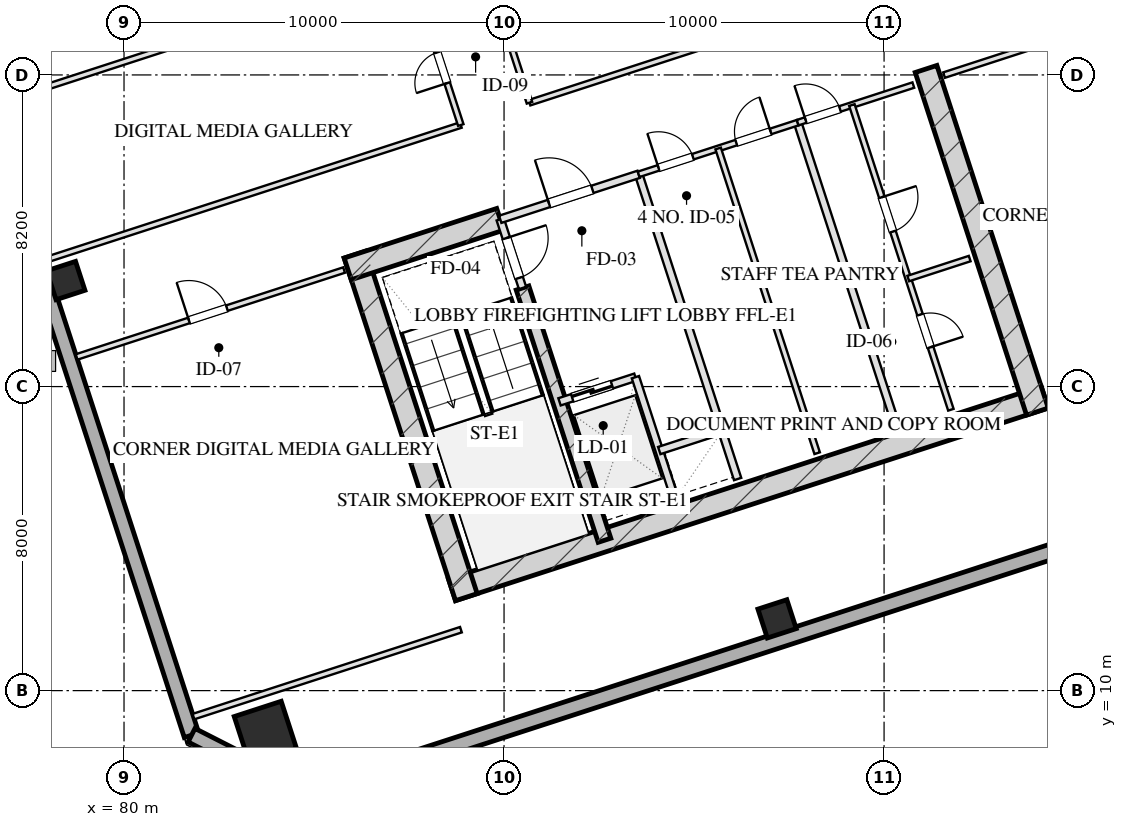
"""IFC4 building model, lengths in metres.
Left out: names, types, materials, properties, quantities, classifications, styles, units other than length and angle.
Written with IfcOpenShell. Run it as: python <this file> out.ifc"""

import sys

from ifc_helpers import new_model, si_unit, direction, frame, frame_2d, origin, origin_2d, place, context, subcontext, project, spatial, rectangle, hollow_rectangle, extrude, element, fill, save


model = new_model("IFC4")
c1 = context("Model", 3, precision=1e-05, world=origin(), true_north=direction((0.0, 1.0)))
c2 = subcontext(c1, "Body", "Model", "MODEL_VIEW")
j1 = project(units=[si_unit("LENGTHUNIT", "METRE"), si_unit("PLANEANGLEUNIT", "RADIAN")], contexts=[c1])
p1 = place(None, origin())
s1 = spatial("IfcSite", under=j1, at=p1, CompositionType="ELEMENT")
p2 = place(p1, origin())
s2 = spatial("IfcBuilding", under=s1, at=p2, CompositionType="ELEMENT")
p3 = place(p2, frame((0.0, 0.0, 173.65)))
s3 = spatial("IfcBuildingStorey", under=s2, at=p3, CompositionType="ELEMENT", Elevation=173.65)
p4 = place(p3, frame((88.63, 12.652, 0.0), z_axis=(0.0, 0.0, 1.0), x_axis=(0.95105714907, 0.309015046886, 0.0)))
e1 = element("IfcWall", 1, at=p4, inside=s3, PredefinedType="SHEAR", context=c2, shape_type="SweptSolid", body=[
    extrude(rectangle(XDim=16.4, YDim=0.6, at=frame_2d((8.2, 0.0))), origin(), (0.0, 0.0, 1.0), 3.45),
])
p5 = place(p3, frame((86.078, 21.475, 0.0), z_axis=(0.0, 0.0, 1.0), x_axis=(0.309017938678, -0.951056209472, 0.0)))
e2 = element("IfcWall", 2, at=p5, inside=s3, PredefinedType="SHEAR", context=c2, shape_type="SweptSolid", body=[
    extrude(rectangle(XDim=9.48, YDim=0.6, at=frame_2d((4.74, 0.0))), origin(), (0.0, 0.0, 1.0), 3.45),
])
p6 = place(p3, frame((101.105, 26.358, 0.0), z_axis=(0.0, 0.0, 1.0), x_axis=(0.309010370028, -0.95105866865, 0.0)))
e3 = element("IfcWall", 3, at=p6, inside=s3, PredefinedType="SHEAR", context=c2, shape_type="SweptSolid", body=[
    extrude(rectangle(XDim=9.48, YDim=0.6, at=frame_2d((4.74, 0.0))), origin(), (0.0, 0.0, 1.0), 3.45),
])
p7 = place(p3, frame((90.486, 20.594, 0.0), z_axis=(0.0, 0.0, 1.0), x_axis=(0.309020428229, -0.951055400562, 0.0)))
e4 = element("IfcWall", 4, at=p7, inside=s3, PredefinedType="SHEAR", context=c2, shape_type="SweptSolid", body=[
    extrude(rectangle(XDim=6.98, YDim=0.35, at=frame_2d((3.49, 0.0))), origin(), (0.0, 0.0, 1.0), 3.45),
])
p8 = place(p3, frame((85.886, 21.097, 0.0), z_axis=(0.0, 0.0, 1.0), x_axis=(0.951068073652, 0.308981422225, 0.0)))
e5 = element("IfcWall", 5, at=p8, inside=s3, PredefinedType="SHEAR", context=c2, shape_type="SweptSolid", body=[
    extrude(rectangle(XDim=4.22, YDim=0.6, at=frame_2d((2.11, 0.0))), origin(), (0.0, 0.0, 1.0), 3.45),
])
p9 = place(p3, frame((83.719, 8.901, 0.0), z_axis=(0.0, 0.0, 1.0), x_axis=(0.951056516295, 0.309016994375, 0.0)))
e6 = element("IfcColumn", 6, at=p9, inside=s3, PredefinedType="COLUMN", context=c2, shape_type="SweptSolid", body=[
    extrude(hollow_rectangle(XDim=1.3, YDim=1.3, WallThickness=0.045, at=origin_2d()), origin(), (0.0, 0.0, 1.0), 3.451),
])
for number, where, z_axis, x_axis in (
    (7, (78.468, 20.79, 0.0), (0.0, 0.0, 1.0), (0.951, 0.309, 0.0)),
    (8, (97.185, 11.888, 0.0), (0.0, 0.0, 1.0), (0.951, 0.309, 0.0)),
):
    element("IfcColumn", number, at=place(p3, frame(where, z_axis=z_axis, x_axis=x_axis)), inside=s3, PredefinedType="COLUMN", context=c2, shape_type="SweptSolid", body=[
        extrude(hollow_rectangle(XDim=0.8, YDim=0.8, WallThickness=0.028, at=origin_2d()), origin(), (0.0, 0.0, 1.0), 3.451),
    ])
p10 = place(p3, frame((81.776, 8.827, 0.0), z_axis=(0.0, 0.0, 1.0), x_axis=(-0.309014228706, 0.951057414911, 0.0)))
e9 = element("IfcWall", 9, at=p10, inside=s3, PredefinedType="SOLIDWALL", context=c2, shape_type="SweptSolid", body=[
    extrude(rectangle(XDim=42.8, YDim=0.4, at=frame_2d((21.4, 0.0))), origin(), (0.0, 0.0, 1.0), 2.61),
])
p11 = place(p10, frame((18.25, 0.0, 0.0)))
e10 = element("IfcOpeningElement", 10, at=p11, cuts=e9, PredefinedType="OPENING", context=c2, shape_type="SweptSolid", body=[
    extrude(rectangle(XDim=1.1, YDim=2.15, at=frame_2d((0.55, 1.075))), frame((0.0, 0.21, 0.0), z_axis=(0.0, -1.0, 0.0), x_axis=(1.0, 0.0, 0.0)), (0.0, 0.0, 1.0), 0.42),
])
p12 = place(p3, frame((98.224, 59.173, 0.0), z_axis=(0.0, 0.0, 1.0), x_axis=(0.309014228706, -0.951057414911, 0.0)))
e11 = element("IfcWall", 11, at=p12, inside=s3, PredefinedType="SOLIDWALL", context=c2, shape_type="SweptSolid", body=[
    extrude(rectangle(XDim=42.8, YDim=0.4, at=frame_2d((21.4, 0.0))), origin(), (0.0, 0.0, 1.0), 2.61),
])
p13 = place(p12, frame((17.675, 0.0, 0.75)))
e12 = element("IfcOpeningElement", 12, at=p13, cuts=e11, PredefinedType="OPENING", context=c2, shape_type="SweptSolid", body=[
    extrude(rectangle(XDim=2.25, YDim=1.46, at=frame_2d((1.125, 0.73))), frame((0.0, 0.21, 0.0), z_axis=(0.0, -1.0, 0.0), x_axis=(1.0, 0.0, 0.0)), (0.0, 0.0, 1.0), 0.42),
])
p14 = place(p12, frame((13.875, 0.0, 0.75)))
e13 = element("IfcOpeningElement", 13, at=p14, cuts=e11, PredefinedType="OPENING", context=c2, shape_type="SweptSolid", body=[
    extrude(rectangle(XDim=2.25, YDim=1.46, at=frame_2d((1.125, 0.73))), frame((0.0, 0.21, 0.0), z_axis=(0.0, -1.0, 0.0), x_axis=(1.0, 0.0, 0.0)), (0.0, 0.0, 1.0), 0.42),
])
p15 = place(p12, frame((25.25, 0.0, 0.0)))
e14 = element("IfcOpeningElement", 14, at=p15, cuts=e11, PredefinedType="OPENING", context=c2, shape_type="SweptSolid", body=[
    extrude(rectangle(XDim=1.1, YDim=2.15, at=frame_2d((0.55, 1.075))), frame((0.0, 0.21, 0.0), z_axis=(0.0, -1.0, 0.0), x_axis=(1.0, 0.0, 0.0)), (0.0, 0.0, 1.0), 0.42),
])
p16 = place(p3, frame((109.908, 15.444, 0.0), z_axis=(0.0, 0.0, 1.0), x_axis=(-0.951057580055, -0.30901372044, 0.0)))
e15 = element("IfcWall", 15, at=p16, inside=s3, PredefinedType="SOLIDWALL", context=c2, shape_type="SweptSolid", body=[
    extrude(rectangle(XDim=26.4, YDim=0.4, at=frame_2d((13.2, 0.0))), origin(), (0.0, 0.0, 1.0), 2.61),
])
p17 = place(p3, frame((84.801, 7.286, 0.0), z_axis=(0.0, 0.0, 1.0), x_axis=(-0.891020832027, 0.453962417932, 0.0)))
e16 = element("IfcWall", 16, at=p17, inside=s3, PredefinedType="SOLIDWALL", context=c2, shape_type="SweptSolid", body=[
    extrude(rectangle(XDim=3.394, YDim=0.4, at=frame_2d((1.697, 0.0))), origin(), (0.0, 0.0, 1.0), 2.61),
])
p18 = place(p3, frame((89.899, 22.401, 0.0), z_axis=(0.0, 0.0, 1.0), x_axis=(0.308932062672, -0.951084108086, 0.0)))
e17 = element("IfcWall", 17, at=p18, inside=s3, PredefinedType="PARTITIONING", context=c2, shape_type="SweptSolid", body=[
    extrude(rectangle(XDim=1.9, YDim=0.2, at=frame_2d((0.95, 0.0))), origin(), (0.0, 0.0, 1.0), 3.175),
])
p19 = place(p18, frame((0.52, 0.0, 0.0)))
e18 = element("IfcOpeningElement", 18, at=p19, cuts=e17, PredefinedType="OPENING", context=c2, shape_type="SweptSolid", body=[
    extrude(rectangle(XDim=1.1, YDim=2.05, at=frame_2d((0.55, 1.025))), frame((0.0, 0.11, 0.0), z_axis=(0.0, -1.0, 0.0), x_axis=(1.0, 0.0, 0.0)), (0.0, 0.0, 1.0), 0.22),
])
p20 = place(p3, frame((93.542, 23.585, 0.0), z_axis=(0.0, 0.0, 1.0), x_axis=(0.309042196757, -0.951048327176, 0.0)))
e19 = element("IfcWall", 19, at=p20, inside=s3, PredefinedType="PARTITIONING", context=c2, shape_type="SweptSolid", body=[
    extrude(rectangle(XDim=8.43, YDim=0.2, at=frame_2d((4.215, 0.0))), origin(), (0.0, 0.0, 1.0), 3.175),
])
p21 = place(p3, frame((89.899, 22.401, 0.0), z_axis=(0.0, 0.0, 1.0), x_axis=(0.951046716504, 0.309047153403, 0.0)))
e20 = element("IfcWall", 20, at=p21, inside=s3, PredefinedType="PARTITIONING", context=c2, shape_type="SweptSolid", body=[
    extrude(rectangle(XDim=3.83, YDim=0.2, at=frame_2d((1.915, 0.0))), origin(), (0.0, 0.0, 1.0), 3.175),
])
p22 = place(p21, frame((1.35, 0.0, 0.0)))
e21 = element("IfcOpeningElement", 21, at=p22, cuts=e20, PredefinedType="OPENING", context=c2, shape_type="SweptSolid", body=[
    extrude(rectangle(XDim=1.2, YDim=2.05, at=frame_2d((0.6, 1.025))), frame((0.0, 0.11, 0.0), z_axis=(0.0, -1.0, 0.0), x_axis=(1.0, 0.0, 0.0)), (0.0, 0.0, 1.0), 0.22),
])
p23 = place(p3, frame((91.46, 17.598, 0.0), z_axis=(0.0, 0.0, 1.0), x_axis=(0.951062257173, 0.308999325213, 0.0)))
e22 = element("IfcWall", 22, at=p23, inside=s3, PredefinedType="PARTITIONING", context=c2, shape_type="SweptSolid", body=[
    extrude(rectangle(XDim=2.1, YDim=0.2, at=frame_2d((1.05, 0.0))), origin(), (0.0, 0.0, 1.0), 3.175),
])
p24 = place(p23, frame((0.35, 0.0, 0.0)))
e23 = element("IfcOpeningElement", 23, at=p24, cuts=e22, PredefinedType="OPENING", context=c2, shape_type="SweptSolid", body=[
    extrude(rectangle(XDim=1.1, YDim=2.05, at=frame_2d((0.55, 1.025))), frame((0.0, 0.11, 0.0), z_axis=(0.0, -1.0, 0.0), x_axis=(1.0, 0.0, 0.0)), (0.0, 0.0, 1.0), 0.22),
])
p25 = place(p3, frame((93.457, 18.247, 0.0), z_axis=(0.0, 0.0, 1.0), x_axis=(0.3089935693, -0.951064127245, 0.0)))
e24 = element("IfcWall", 24, at=p25, inside=s3, PredefinedType="PARTITIONING", context=c2, shape_type="SweptSolid", body=[
    extrude(rectangle(XDim=3.7, YDim=0.2, at=frame_2d((1.85, 0.0))), origin(), (0.0, 0.0, 1.0), 3.175),
])
p26 = place(p3, frame((94.084, 16.317, 0.0), z_axis=(0.0, 0.0, 1.0), x_axis=(0.951041328149, 0.309063734775, 0.0)))
e25 = element("IfcWall", 25, at=p26, inside=s3, PredefinedType="PARTITIONING", context=c2, shape_type="SweptSolid", body=[
    extrude(rectangle(XDim=1.73, YDim=0.2, at=frame_2d((0.865, 0.0))), origin(), (0.0, 0.0, 1.0), 3.175),
])
p27 = place(p3, frame((97.727, 24.944, 0.0), z_axis=(0.0, 0.0, 1.0), x_axis=(0.309016001439, -0.951056838919, 0.0)))
e26 = element("IfcWall", 26, at=p27, inside=s3, PredefinedType="PARTITIONING", context=c2, shape_type="SweptSolid", body=[
    extrude(rectangle(XDim=8.43, YDim=0.2, at=frame_2d((4.215, 0.0))), origin(), (0.0, 0.0, 1.0), 3.175),
])
p28 = place(p3, frame((93.542, 23.585, 0.0), z_axis=(0.0, 0.0, 1.0), x_axis=(0.951063829732, 0.308994485023, 0.0)))
e27 = element("IfcWall", 27, at=p28, inside=s3, PredefinedType="PARTITIONING", context=c2, shape_type="SweptSolid", body=[
    extrude(rectangle(XDim=4.4, YDim=0.15, at=frame_2d((2.2, 0.0))), origin(), (0.0, 0.0, 1.0), 3.175),
])
p29 = place(p28, frame((0.55, 0.0, 0.0)))
e28 = element("IfcOpeningElement", 28, at=p29, cuts=e27, PredefinedType="OPENING", context=c2, shape_type="SweptSolid", body=[
    extrude(rectangle(XDim=0.95, YDim=2.05, at=frame_2d((0.475, 1.025))), frame((0.0, 0.085, 0.0), z_axis=(0.0, -1.0, 0.0), x_axis=(1.0, 0.0, 0.0)), (0.0, 0.0, 1.0), 0.17),
])
p30 = place(p28, frame((2.7, 0.0, 0.0)))
e29 = element("IfcOpeningElement", 29, at=p30, cuts=e27, PredefinedType="OPENING", context=c2, shape_type="SweptSolid", body=[
    extrude(rectangle(XDim=0.95, YDim=2.05, at=frame_2d((0.475, 1.025))), frame((0.0, 0.085, 0.0), z_axis=(0.0, -1.0, 0.0), x_axis=(1.0, 0.0, 0.0)), (0.0, 0.0, 1.0), 0.17),
])
p31 = place(p3, frame((95.634, 24.265, 0.0), z_axis=(0.0, 0.0, 1.0), x_axis=(0.309007490203, -0.951059604335, 0.0)))
e30 = element("IfcWall", 30, at=p31, inside=s3, PredefinedType="PARTITIONING", context=c2, shape_type="SweptSolid", body=[
    extrude(rectangle(XDim=8.43, YDim=0.15, at=frame_2d((4.215, 0.0))), origin(), (0.0, 0.0, 1.0), 3.175),
])
p32 = place(p3, frame((97.727, 24.944, 0.0), z_axis=(0.0, 0.0, 1.0), x_axis=(0.951036872128, 0.309077446369, 0.0)))
e31 = element("IfcWall", 31, at=p32, inside=s3, PredefinedType="PARTITIONING", context=c2, shape_type="SweptSolid", body=[
    extrude(rectangle(XDim=3.2, YDim=0.15, at=frame_2d((1.6, 0.0))), origin(), (0.0, 0.0, 1.0), 3.175),
])
p33 = place(p32, frame((0.22, 0.0, 0.0)))
e32 = element("IfcOpeningElement", 32, at=p33, cuts=e31, PredefinedType="OPENING", context=c2, shape_type="SweptSolid", body=[
    extrude(rectangle(XDim=0.95, YDim=2.05, at=frame_2d((0.475, 1.025))), frame((0.0, 0.085, 0.0), z_axis=(0.0, -1.0, 0.0), x_axis=(1.0, 0.0, 0.0)), (0.0, 0.0, 1.0), 0.17),
])
p34 = place(p3, frame((99.153, 25.408, 0.0), z_axis=(0.0, 0.0, 1.0), x_axis=(0.309016001439, -0.951056838919, 0.0)))
e33 = element("IfcWall", 33, at=p34, inside=s3, PredefinedType="PARTITIONING", context=c2, shape_type="SweptSolid", body=[
    extrude(rectangle(XDim=8.43, YDim=0.15, at=frame_2d((4.215, 0.0))), origin(), (0.0, 0.0, 1.0), 3.175),
])
p35 = place(p34, frame((2.55, 0.0, 0.0)))
e34 = element("IfcOpeningElement", 34, at=p35, cuts=e33, PredefinedType="OPENING", context=c2, shape_type="SweptSolid", body=[
    extrude(rectangle(XDim=0.95, YDim=2.05, at=frame_2d((0.475, 1.025))), frame((0.0, 0.085, 0.0), z_axis=(0.0, -1.0, 0.0), x_axis=(1.0, 0.0, 0.0)), (0.0, 0.0, 1.0), 0.17),
])
p36 = place(p34, frame((5.8, 0.0, 0.0)))
e35 = element("IfcOpeningElement", 35, at=p36, cuts=e33, PredefinedType="OPENING", context=c2, shape_type="SweptSolid", body=[
    extrude(rectangle(XDim=0.9, YDim=2.05, at=frame_2d((0.45, 1.025))), frame((0.0, 0.085, 0.0), z_axis=(0.0, -1.0, 0.0), x_axis=(1.0, 0.0, 0.0)), (0.0, 0.0, 1.0), 0.17),
])
p37 = place(p3, frame((100.636, 20.843, 0.0), z_axis=(0.0, 0.0, 1.0), x_axis=(0.951040401051, 0.309066587596, 0.0)))
e36 = element("IfcWall", 36, at=p37, inside=s3, PredefinedType="PARTITIONING", context=c2, shape_type="SweptSolid", body=[
    extrude(rectangle(XDim=1.7, YDim=0.15, at=frame_2d((0.85, 0.0))), origin(), (0.0, 0.0, 1.0), 3.175),
])
p38 = place(p3, frame((81.828, 9.316, 0.0), z_axis=(0.0, 0.0, 1.0), x_axis=(0.95105128112, 0.309033106124, 0.0)))
e37 = element("IfcWall", 37, at=p38, inside=s3, PredefinedType="PARTITIONING", context=c2, shape_type="SweptSolid", body=[
    extrude(rectangle(XDim=7.4, YDim=0.15, at=frame_2d((3.7, 0.0))), origin(), (0.0, 0.0, 1.0), 3.175),
])
p39 = place(p3, frame((78.753, 18.78, 0.0), z_axis=(0.0, 0.0, 1.0), x_axis=(0.951060977215, 0.309003264738, 0.0)))
e38 = element("IfcWall", 38, at=p39, inside=s3, PredefinedType="PARTITIONING", context=c2, shape_type="SweptSolid", body=[
    extrude(rectangle(XDim=7.4, YDim=0.15, at=frame_2d((3.7, 0.0))), origin(), (0.0, 0.0, 1.0), 3.175),
])
p40 = place(p39, frame((3.108, 0.0, 0.0)))
e39 = element("IfcOpeningElement", 39, at=p40, cuts=e38, PredefinedType="OPENING", context=c2, shape_type="SweptSolid", body=[
    extrude(rectangle(XDim=1.05, YDim=2.05, at=frame_2d((0.525, 1.025))), frame((0.0, 0.085, 0.0), z_axis=(0.0, -1.0, 0.0), x_axis=(1.0, 0.0, 0.0)), (0.0, 0.0, 1.0), 0.17),
])
p41 = place(p3, frame((101.578, 26.196, 0.0), z_axis=(0.0, 0.0, 1.0), x_axis=(0.951064934653, 0.308991084134, 0.0)))
e40 = element("IfcWall", 40, at=p41, inside=s3, PredefinedType="PARTITIONING", context=c2, shape_type="SweptSolid", body=[
    extrude(rectangle(XDim=6.8, YDim=0.15, at=frame_2d((3.4, 0.0))), origin(), (0.0, 0.0, 1.0), 3.175),
])
p42 = place(p41, frame((2.856, 0.0, 0.0)))
e41 = element("IfcOpeningElement", 41, at=p42, cuts=e40, PredefinedType="OPENING", context=c2, shape_type="SweptSolid", body=[
    extrude(rectangle(XDim=1.0, YDim=2.05, at=frame_2d((0.5, 1.025))), frame((0.0, 0.085, 0.0), z_axis=(0.0, -1.0, 0.0), x_axis=(1.0, 0.0, 0.0)), (0.0, 0.0, 1.0), 0.17),
])
p43 = place(p3, frame((77.925, 21.328, 0.0), z_axis=(0.0, 0.0, 1.0), x_axis=(0.951054972381, 0.309021746015, 0.0)))
e42 = element("IfcWall", 42, at=p43, inside=s3, PredefinedType="PARTITIONING", context=c2, shape_type="SweptSolid", body=[
    extrude(rectangle(XDim=11.5, YDim=0.15, at=frame_2d((5.75, 0.0))), origin(), (0.0, 0.0, 1.0), 3.175),
])
p44 = place(p3, frame((90.669, 25.469, 0.0), z_axis=(0.0, 0.0, 1.0), x_axis=(0.95106136293, 0.309002077568, 0.0)))
e43 = element("IfcWall", 43, at=p44, inside=s3, PredefinedType="PARTITIONING", context=c2, shape_type="SweptSolid", body=[
    extrude(rectangle(XDim=8.15, YDim=0.15, at=frame_2d((4.075, 0.0))), origin(), (0.0, 0.0, 1.0), 3.175),
])
p45 = place(p3, frame((88.862, 24.882, 0.0), z_axis=(0.0, 0.0, 1.0), x_axis=(-0.309008771245, 0.951059188113, 0.0)))
e44 = element("IfcWall", 44, at=p45, inside=s3, PredefinedType="PARTITIONING", context=c2, shape_type="SweptSolid", body=[
    extrude(rectangle(XDim=16.64, YDim=0.15, at=frame_2d((8.32, 0.0))), origin(), (0.0, 0.0, 1.0), 3.175),
])
p46 = place(p45, frame((1.16, 0.0, 0.0)))
e45 = element("IfcOpeningElement", 45, at=p46, cuts=e44, PredefinedType="OPENING", context=c2, shape_type="SweptSolid", body=[
    extrude(rectangle(XDim=0.85, YDim=2.05, at=frame_2d((0.425, 1.025))), frame((0.0, 0.085, 0.0), z_axis=(0.0, -1.0, 0.0), x_axis=(1.0, 0.0, 0.0)), (0.0, 0.0, 1.0), 0.17),
])
p47 = place(p45, frame((5.48, 0.0, 0.0)))
e46 = element("IfcOpeningElement", 46, at=p47, cuts=e44, PredefinedType="OPENING", context=c2, shape_type="SweptSolid", body=[
    extrude(rectangle(XDim=1.0, YDim=2.05, at=frame_2d((0.5, 1.025))), frame((0.0, 0.085, 0.0), z_axis=(0.0, -1.0, 0.0), x_axis=(1.0, 0.0, 0.0)), (0.0, 0.0, 1.0), 0.17),
])
p48 = place(p45, frame((8.08, 0.0, 0.0)))
e47 = element("IfcOpeningElement", 47, at=p48, cuts=e44, PredefinedType="OPENING", context=c2, shape_type="SweptSolid", body=[
    extrude(rectangle(XDim=1.0, YDim=2.05, at=frame_2d((0.5, 1.025))), frame((0.0, 0.085, 0.0), z_axis=(0.0, -1.0, 0.0), x_axis=(1.0, 0.0, 0.0)), (0.0, 0.0, 1.0), 0.17),
])
p49 = place(p45, frame((10.92, 0.0, 0.0)))
e48 = element("IfcOpeningElement", 48, at=p49, cuts=e44, PredefinedType="OPENING", context=c2, shape_type="SweptSolid", body=[
    extrude(rectangle(XDim=1.05, YDim=2.05, at=frame_2d((0.525, 1.025))), frame((0.0, 0.085, 0.0), z_axis=(0.0, -1.0, 0.0), x_axis=(1.0, 0.0, 0.0)), (0.0, 0.0, 1.0), 0.17),
])
p50 = place(p45, frame((14.48, 0.0, 0.0)))
e49 = element("IfcOpeningElement", 49, at=p50, cuts=e44, PredefinedType="OPENING", context=c2, shape_type="SweptSolid", body=[
    extrude(rectangle(XDim=1.0, YDim=2.05, at=frame_2d((0.5, 1.025))), frame((0.0, 0.085, 0.0), z_axis=(0.0, -1.0, 0.0), x_axis=(1.0, 0.0, 0.0)), (0.0, 0.0, 1.0), 0.17),
])
p51 = place(p3, frame((90.669, 25.469, 0.0), z_axis=(0.0, 0.0, 1.0), x_axis=(-0.309022042254, 0.951054876125, 0.0)))
e50 = element("IfcWall", 50, at=p51, inside=s3, PredefinedType="PARTITIONING", context=c2, shape_type="SweptSolid", body=[
    extrude(rectangle(XDim=16.64, YDim=0.15, at=frame_2d((8.32, 0.0))), origin(), (0.0, 0.0, 1.0), 3.175),
])
p52 = place(p51, frame((1.944, 0.0, 0.0)))
e51 = element("IfcOpeningElement", 51, at=p52, cuts=e50, PredefinedType="OPENING", context=c2, shape_type="SweptSolid", body=[
    extrude(rectangle(XDim=1.1, YDim=2.05, at=frame_2d((0.55, 1.025))), frame((0.0, 0.085, 0.0), z_axis=(0.0, -1.0, 0.0), x_axis=(1.0, 0.0, 0.0)), (0.0, 0.0, 1.0), 0.17),
])
p53 = place(p51, frame((14.264, 0.0, 0.0)))
e52 = element("IfcOpeningElement", 52, at=p53, cuts=e50, PredefinedType="OPENING", context=c2, shape_type="SweptSolid", body=[
    extrude(rectangle(XDim=1.1, YDim=2.05, at=frame_2d((0.55, 1.025))), frame((0.0, 0.085, 0.0), z_axis=(0.0, -1.0, 0.0), x_axis=(1.0, 0.0, 0.0)), (0.0, 0.0, 1.0), 0.17),
])
p54 = place(p3, frame((76.59, 25.437, 0.0), z_axis=(0.0, 0.0, 1.0), x_axis=(0.951054972381, 0.309021746015, 0.0)))
e53 = element("IfcWall", 53, at=p54, inside=s3, PredefinedType="PARTITIONING", context=c2, shape_type="SweptSolid", body=[
    extrude(rectangle(XDim=11.5, YDim=0.15, at=frame_2d((5.75, 0.0))), origin(), (0.0, 0.0, 1.0), 3.175),
])
p55 = place(p19, origin())
e54 = element("IfcDoor", 54, at=p55, inside=s3, OperationType="SINGLE_SWING_LEFT", PredefinedType="DOOR", context=c2, shape_type="SweptSolid", body=[
    extrude(rectangle(XDim=1.1, YDim=2.05, at=frame_2d((0.55, 1.025))), frame((0.0, 0.025, 0.0), z_axis=(0.0, -1.0, 0.0), x_axis=(1.0, 0.0, 0.0)), (0.0, 0.0, 1.0), 0.05),
])
fill(e18, e54)
p56 = place(p22, origin())
e55 = element("IfcDoor", 55, at=p56, inside=s3, OperationType="SINGLE_SWING_LEFT", PredefinedType="DOOR", context=c2, shape_type="SweptSolid", body=[
    extrude(rectangle(XDim=1.2, YDim=2.05, at=frame_2d((0.6, 1.025))), frame((0.0, 0.025, 0.0), z_axis=(0.0, -1.0, 0.0), x_axis=(1.0, 0.0, 0.0)), (0.0, 0.0, 1.0), 0.05),
])
fill(e21, e55)
p57 = place(p24, origin())
e56 = element("IfcDoor", 56, at=p57, inside=s3, OperationType="DOUBLE_DOOR_SLIDING", PredefinedType="DOOR", context=c2, shape_type="SweptSolid", body=[
    extrude(rectangle(XDim=1.1, YDim=2.05, at=frame_2d((0.55, 1.025))), frame((0.0, 0.025, 0.0), z_axis=(0.0, -1.0, 0.0), x_axis=(1.0, 0.0, 0.0)), (0.0, 0.0, 1.0), 0.05),
])
fill(e23, e56)
p58 = place(p29, origin())
e57 = element("IfcDoor", 57, at=p58, inside=s3, OperationType="SINGLE_SWING_LEFT", PredefinedType="DOOR", context=c2, shape_type="SweptSolid", body=[
    extrude(rectangle(XDim=0.95, YDim=2.05, at=frame_2d((0.475, 1.025))), frame((0.0, 0.025, 0.0), z_axis=(0.0, -1.0, 0.0), x_axis=(1.0, 0.0, 0.0)), (0.0, 0.0, 1.0), 0.05),
])
fill(e28, e57)
p59 = place(p30, origin())
e58 = element("IfcDoor", 58, at=p59, inside=s3, OperationType="SINGLE_SWING_RIGHT", PredefinedType="DOOR", context=c2, shape_type="SweptSolid", body=[
    extrude(rectangle(XDim=0.95, YDim=2.05, at=frame_2d((0.475, 1.025))), frame((0.0, 0.025, 0.0), z_axis=(0.0, -1.0, 0.0), x_axis=(1.0, 0.0, 0.0)), (0.0, 0.0, 1.0), 0.05),
])
fill(e29, e58)
p60 = place(p33, origin())
e59 = element("IfcDoor", 59, at=p60, inside=s3, OperationType="SINGLE_SWING_LEFT", PredefinedType="DOOR", context=c2, shape_type="SweptSolid", body=[
    extrude(rectangle(XDim=0.95, YDim=2.05, at=frame_2d((0.475, 1.025))), frame((0.0, 0.025, 0.0), z_axis=(0.0, -1.0, 0.0), x_axis=(1.0, 0.0, 0.0)), (0.0, 0.0, 1.0), 0.05),
])
fill(e32, e59)
p61 = place(p35, origin())
e60 = element("IfcDoor", 60, at=p61, inside=s3, OperationType="SINGLE_SWING_LEFT", PredefinedType="DOOR", context=c2, shape_type="SweptSolid", body=[
    extrude(rectangle(XDim=0.95, YDim=2.05, at=frame_2d((0.475, 1.025))), frame((0.0, 0.025, 0.0), z_axis=(0.0, -1.0, 0.0), x_axis=(1.0, 0.0, 0.0)), (0.0, 0.0, 1.0), 0.05),
])
fill(e34, e60)
p62 = place(p36, origin())
e61 = element("IfcDoor", 61, at=p62, inside=s3, OperationType="SINGLE_SWING_RIGHT", PredefinedType="DOOR", context=c2, shape_type="SweptSolid", body=[
    extrude(rectangle(XDim=0.9, YDim=2.05, at=frame_2d((0.45, 1.025))), frame((0.0, 0.025, 0.0), z_axis=(0.0, -1.0, 0.0), x_axis=(1.0, 0.0, 0.0)), (0.0, 0.0, 1.0), 0.05),
])
fill(e35, e61)
p63 = place(p40, origin())
e62 = element("IfcDoor", 62, at=p63, inside=s3, OperationType="SINGLE_SWING_LEFT", PredefinedType="DOOR", context=c2, shape_type="SweptSolid", body=[
    extrude(rectangle(XDim=1.05, YDim=2.05, at=frame_2d((0.525, 1.025))), frame((0.0, 0.025, 0.0), z_axis=(0.0, -1.0, 0.0), x_axis=(1.0, 0.0, 0.0)), (0.0, 0.0, 1.0), 0.05),
])
fill(e39, e62)
p64 = place(p46, origin())
e63 = element("IfcDoor", 63, at=p64, inside=s3, OperationType="SINGLE_SWING_LEFT", PredefinedType="DOOR", context=c2, shape_type="SweptSolid", body=[
    extrude(rectangle(XDim=0.85, YDim=2.05, at=frame_2d((0.425, 1.025))), frame((0.0, 0.025, 0.0), z_axis=(0.0, -1.0, 0.0), x_axis=(1.0, 0.0, 0.0)), (0.0, 0.0, 1.0), 0.05),
])
fill(e45, e63)
save(model, sys.argv[1])
